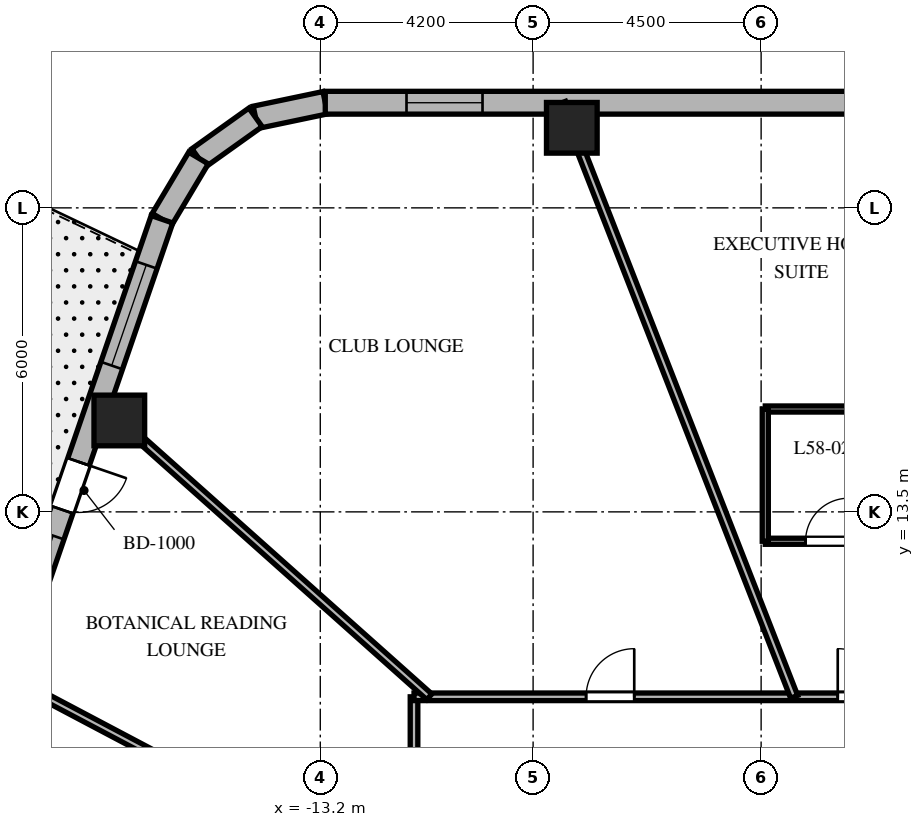
"""IFC4 building model, lengths in metres.
Left out: names, types, materials, properties, quantities, classifications, styles, units other than length and angle.
Written with IfcOpenShell. Run it as: python <this file> out.ifc"""

import sys

from ifc_helpers import new_model, si_unit, direction, frame, frame_2d, origin, origin_2d, place, context, subcontext, project, spatial, rectangle, extrude, element, fill, save


model = new_model("IFC4")
c1 = context("Model", 3, precision=1e-05, world=origin(), true_north=direction((0.0, 1.0)))
c2 = subcontext(c1, "Body", "Model", "MODEL_VIEW")
j1 = project(units=[si_unit("LENGTHUNIT", "METRE"), si_unit("PLANEANGLEUNIT", "RADIAN")], contexts=[c1])
p1 = place(None, origin())
s1 = spatial("IfcSite", under=j1, at=p1, CompositionType="ELEMENT")
p2 = place(p1, origin())
s2 = spatial("IfcBuilding", under=s1, at=p2, CompositionType="ELEMENT")
p3 = place(p2, frame((0.0, 0.0, 233.1)))
s3 = spatial("IfcBuildingStorey", under=s2, at=p3, CompositionType="ELEMENT", Elevation=233.1)
for number, where, z_axis, x_axis in (
    (1, (-8.236, 21.08, 0.0), (0.0, 0.0, 1.0), (1.0, 0.0, 0.0)),
    (2, (-17.166, 15.304, 0.0), (0.0, 0.0, 1.0), (1.0, 0.0, 0.0)),
):
    element("IfcColumn", number, at=place(p3, frame(where, z_axis=z_axis, x_axis=x_axis)), inside=s3, PredefinedType="COLUMN", context=c2, shape_type="SweptSolid", body=[
        extrude(rectangle(XDim=1.0, YDim=1.0, at=origin_2d()), origin(), (0.0, 0.0, 1.0), 3.8),
    ])
p4 = place(p3, frame((-13.102, 21.575, 0.0), z_axis=(0.0, 0.0, 1.0), x_axis=(-0.978757421505, -0.205021730188, 0.0)))
e3 = element("IfcWall", 3, at=p4, inside=s3, PredefinedType="SOLIDWALL", context=c2, shape_type="SweptSolid", body=[
    extrude(rectangle(XDim=1.406, YDim=0.45, at=frame_2d((0.703, 0.0))), origin(), (0.0, 0.0, 1.0), 3.5),
])
p5 = place(p3, frame((-14.478, 21.287, 0.0), z_axis=(0.0, 0.0, 1.0), x_axis=(-0.813888518617, -0.58102106611, 0.0)))
e4 = element("IfcWall", 4, at=p5, inside=s3, PredefinedType="SOLIDWALL", context=c2, shape_type="SweptSolid", body=[
    extrude(rectangle(XDim=1.383, YDim=0.45, at=frame_2d((0.691, 0.0))), origin(), (0.0, 0.0, 1.0), 3.5),
])
p6 = place(p3, frame((-15.604, 20.483, 0.0), z_axis=(0.0, 0.0, 1.0), x_axis=(-0.512222149036, -0.858852996756, 0.0)))
e5 = element("IfcWall", 5, at=p6, inside=s3, PredefinedType="SOLIDWALL", context=c2, shape_type="SweptSolid", body=[
    extrude(rectangle(XDim=1.406, YDim=0.45, at=frame_2d((0.703, 0.0))), origin(), (0.0, 0.0, 1.0), 3.5),
])
p7 = place(p3, frame((11.298, 21.575, 0.0), z_axis=(0.0, 0.0, 1.0), x_axis=(-1.0, 0.0, 0.0)))
e6 = element("IfcWall", 6, at=p7, inside=s3, PredefinedType="SOLIDWALL", context=c2, shape_type="SweptSolid", body=[
    extrude(rectangle(XDim=24.399, YDim=0.45, at=frame_2d((12.2, 0.0))), origin(), (0.0, 0.0, 1.0), 3.5),
])
p8 = place(p7, frame((1.604, 0.0, 0.8)))
e7 = element("IfcOpeningElement", 7, at=p8, cuts=e6, PredefinedType="OPENING", context=c2, shape_type="SweptSolid", body=[
    extrude(rectangle(XDim=1.5, YDim=1.8, at=frame_2d((0.75, 0.9))), frame((0.0, 0.235, 0.0), z_axis=(0.0, -1.0, 0.0), x_axis=(1.0, 0.0, 0.0)), (0.0, 0.0, 1.0), 0.47),
])
p9 = place(p7, frame((11.451, 0.0, 0.8)))
e8 = element("IfcOpeningElement", 8, at=p9, cuts=e6, PredefinedType="OPENING", context=c2, shape_type="SweptSolid", body=[
    extrude(rectangle(XDim=1.5, YDim=1.8, at=frame_2d((0.75, 0.9))), frame((0.0, 0.235, 0.0), z_axis=(0.0, -1.0, 0.0), x_axis=(1.0, 0.0, 0.0)), (0.0, 0.0, 1.0), 0.47),
])
p10 = place(p7, frame((21.296, 0.0, 0.8)))
e9 = element("IfcOpeningElement", 9, at=p10, cuts=e6, PredefinedType="OPENING", context=c2, shape_type="SweptSolid", body=[
    extrude(rectangle(XDim=1.5, YDim=1.8, at=frame_2d((0.75, 0.9))), frame((0.0, 0.235, 0.0), z_axis=(0.0, -1.0, 0.0), x_axis=(1.0, 0.0, 0.0)), (0.0, 0.0, 1.0), 0.47),
])
p11 = place(p3, frame((-16.324, 19.275, 0.0), z_axis=(0.0, 0.0, 1.0), x_axis=(-0.325083142304, -0.945685439557, 0.0)))
e10 = element("IfcWall", 10, at=p11, inside=s3, PredefinedType="SOLIDWALL", context=c2, shape_type="SweptSolid", body=[
    extrude(rectangle(XDim=20.224, YDim=0.45, at=frame_2d((10.112, 0.0))), origin(), (0.0, 0.0, 1.0), 3.5),
])
p12 = place(p11, frame((5.062, 0.0, 0.0)))
e11 = element("IfcOpeningElement", 11, at=p12, cuts=e10, PredefinedType="OPENING", context=c2, shape_type="SweptSolid", body=[
    extrude(rectangle(XDim=1.0, YDim=2.15, at=frame_2d((0.5, 1.075))), frame((0.0, 0.235, 0.0), z_axis=(0.0, -1.0, 0.0), x_axis=(1.0, 0.0, 0.0)), (0.0, 0.0, 1.0), 0.47),
])
p13 = place(p11, frame((0.953, 0.0, 0.8)))
e12 = element("IfcOpeningElement", 12, at=p13, cuts=e10, PredefinedType="OPENING", context=c2, shape_type="SweptSolid", body=[
    extrude(rectangle(XDim=2.1, YDim=1.85, at=frame_2d((1.05, 0.925))), frame((0.0, 0.235, 0.0), z_axis=(0.0, -1.0, 0.0), x_axis=(1.0, 0.0, 0.0)), (0.0, 0.0, 1.0), 0.47),
])
p14 = place(p11, frame((6.604, 0.0, 0.8)))
e13 = element("IfcOpeningElement", 13, at=p14, cuts=e10, PredefinedType="OPENING", context=c2, shape_type="SweptSolid", body=[
    extrude(rectangle(XDim=2.1, YDim=1.85, at=frame_2d((1.05, 0.925))), frame((0.0, 0.235, 0.0), z_axis=(0.0, -1.0, 0.0), x_axis=(1.0, 0.0, 0.0)), (0.0, 0.0, 1.0), 0.47),
])
p15 = place(p11, frame((11.585, 0.0, 0.8)))
e14 = element("IfcOpeningElement", 14, at=p15, cuts=e10, PredefinedType="OPENING", context=c2, shape_type="SweptSolid", body=[
    extrude(rectangle(XDim=2.1, YDim=1.85, at=frame_2d((1.05, 0.925))), frame((0.0, 0.235, 0.0), z_axis=(0.0, -1.0, 0.0), x_axis=(1.0, 0.0, 0.0)), (0.0, 0.0, 1.0), 0.47),
])
p16 = place(p11, frame((17.118, 0.0, 0.8)))
e15 = element("IfcOpeningElement", 15, at=p16, cuts=e10, PredefinedType="OPENING", context=c2, shape_type="SweptSolid", body=[
    extrude(rectangle(XDim=2.1, YDim=1.85, at=frame_2d((1.05, 0.925))), frame((0.0, 0.235, 0.0), z_axis=(0.0, -1.0, 0.0), x_axis=(1.0, 0.0, 0.0)), (0.0, 0.0, 1.0), 0.47),
])
p17 = place(p3, frame((-11.35, 4.4, 0.0), z_axis=(0.0, 0.0, 1.0), x_axis=(0.0, 1.0, 0.0)))
e16 = element("IfcWall", 16, at=p17, inside=s3, PredefinedType="PARTITIONING", context=c2, shape_type="SweptSolid", body=[
    extrude(rectangle(XDim=5.45, YDim=0.15, at=frame_2d((2.725, 0.0))), origin(), (0.0, 0.0, 1.0), 2.99),
])
p18 = place(p17, frame((2.955, 0.0, 0.0)))
e17 = element("IfcOpeningElement", 17, at=p18, cuts=e16, PredefinedType="OPENING", context=c2, shape_type="SweptSolid", body=[
    extrude(rectangle(XDim=0.9, YDim=2.03, at=frame_2d((0.45, 1.015))), frame((0.0, 0.085, 0.0), z_axis=(0.0, -1.0, 0.0), x_axis=(1.0, 0.0, 0.0)), (0.0, 0.0, 1.0), 0.17),
])
p19 = place(p3, frame((-11.35, 9.85, 0.0), z_axis=(0.0, 0.0, 1.0), x_axis=(1.0, 0.0, 0.0)))
e18 = element("IfcWall", 18, at=p19, inside=s3, PredefinedType="PARTITIONING", context=c2, shape_type="SweptSolid", body=[
    extrude(rectangle(XDim=10.43, YDim=0.15, at=frame_2d((5.215, 0.0))), origin(), (0.0, 0.0, 1.0), 2.99),
])
p20 = place(p19, frame((8.362, 0.0, 0.0)))
e19 = element("IfcOpeningElement", 19, at=p20, cuts=e18, PredefinedType="OPENING", context=c2, shape_type="SweptSolid", body=[
    extrude(rectangle(XDim=0.95, YDim=2.03, at=frame_2d((0.475, 1.015))), frame((0.0, 0.085, 0.0), z_axis=(0.0, -1.0, 0.0), x_axis=(1.0, 0.0, 0.0)), (0.0, 0.0, 1.0), 0.17),
])
p21 = place(p19, frame((3.396, 0.0, 0.0)))
e20 = element("IfcOpeningElement", 20, at=p21, cuts=e18, PredefinedType="OPENING", context=c2, shape_type="SweptSolid", body=[
    extrude(rectangle(XDim=0.95, YDim=2.03, at=frame_2d((0.475, 1.015))), frame((0.0, 0.085, 0.0), z_axis=(0.0, -1.0, 0.0), x_axis=(1.0, 0.0, 0.0)), (0.0, 0.0, 1.0), 0.17),
])
p22 = place(p3, frame((-3.848, 9.85, 0.0), z_axis=(0.0, 0.0, 1.0), x_axis=(-0.363921778212, 0.931429513889, 0.0)))
e21 = element("IfcWall", 21, at=p22, inside=s3, PredefinedType="PARTITIONING", context=c2, shape_type="SweptSolid", body=[
    extrude(rectangle(XDim=12.588, YDim=0.15, at=frame_2d((6.294, 0.0))), origin(), (0.0, 0.0, 1.0), 2.74),
])
p23 = place(p3, frame((-11.048, 9.85, 0.0), z_axis=(0.0, 0.0, 1.0), x_axis=(-0.746444434655, 0.665447748492, 0.0)))
e22 = element("IfcWall", 22, at=p23, inside=s3, PredefinedType="PARTITIONING", context=c2, shape_type="SweptSolid", body=[
    extrude(rectangle(XDim=8.732, YDim=0.15, at=frame_2d((4.366, 0.0))), origin(), (0.0, 0.0, 1.0), 2.74),
])
p24 = place(p3, frame((-11.35, 5.999, 0.0), z_axis=(0.0, 0.0, 1.0), x_axis=(-0.884112301724, 0.467274478161, 0.0)))
e23 = element("IfcWall", 23, at=p24, inside=s3, PredefinedType="PARTITIONING", context=c2, shape_type="SweptSolid", body=[
    extrude(rectangle(XDim=9.129, YDim=0.15, at=frame_2d((4.564, 0.0))), origin(), (0.0, 0.0, 1.0), 2.74),
])
p25 = place(p3, frame((-4.418, 12.92, 0.0), z_axis=(0.0, 0.0, 1.0), x_axis=(1.0, 0.0, 0.0)))
e24 = element("IfcWall", 24, at=p25, inside=s3, PredefinedType="PARTITIONING", context=c2, shape_type="SweptSolid", body=[
    extrude(rectangle(XDim=2.44, YDim=0.12, at=frame_2d((1.22, 0.0))), origin(), (0.0, 0.0, 1.0), 3.5),
])
p26 = place(p25, frame((0.795, 0.0, 0.0)))
e25 = element("IfcOpeningElement", 25, at=p26, cuts=e24, PredefinedType="OPENING", context=c2, shape_type="SweptSolid", body=[
    extrude(rectangle(XDim=0.85, YDim=2.03, at=frame_2d((0.425, 1.015))), frame((0.0, 0.07, 0.0), z_axis=(0.0, -1.0, 0.0), x_axis=(1.0, 0.0, 0.0)), (0.0, 0.0, 1.0), 0.14),
])
p27 = place(p3, frame((-1.978, 15.53, 0.0), z_axis=(0.0, 0.0, 1.0), x_axis=(-1.0, 0.0, 0.0)))
e26 = element("IfcWall", 26, at=p27, inside=s3, PredefinedType="PARTITIONING", context=c2, shape_type="SweptSolid", body=[
    extrude(rectangle(XDim=2.44, YDim=0.12, at=frame_2d((1.22, 0.0))), origin(), (0.0, 0.0, 1.0), 3.5),
])
p28 = place(p3, frame((-4.418, 15.53, 0.0), z_axis=(0.0, 0.0, 1.0), x_axis=(0.0, -1.0, 0.0)))
e27 = element("IfcWall", 27, at=p28, inside=s3, PredefinedType="PARTITIONING", context=c2, shape_type="SweptSolid", body=[
    extrude(rectangle(XDim=2.61, YDim=0.12, at=frame_2d((1.305, 0.0))), origin(), (0.0, 0.0, 1.0), 3.026),
])
p29 = place(p10, origin())
e28 = element("IfcWindow", 28, at=p29, inside=s3, PartitioningType="SINGLE_PANEL", PredefinedType="WINDOW", context=c2, shape_type="SweptSolid", body=[
    extrude(rectangle(XDim=1.5, YDim=1.8, at=frame_2d((0.75, 0.9))), frame((0.0, 0.03, 0.0), z_axis=(0.0, -1.0, 0.0), x_axis=(1.0, 0.0, 0.0)), (0.0, 0.0, 1.0), 0.06),
])
fill(e9, e28)
p30 = place(p12, origin())
e29 = element("IfcDoor", 29, at=p30, inside=s3, OperationType="SINGLE_SWING_LEFT", PredefinedType="DOOR", context=c2, shape_type="SweptSolid", body=[
    extrude(rectangle(XDim=1.0, YDim=2.15, at=frame_2d((0.5, 1.075))), frame((0.0, 0.025, 0.0), z_axis=(0.0, -1.0, 0.0), x_axis=(1.0, 0.0, 0.0)), (0.0, 0.0, 1.0), 0.05),
])
fill(e11, e29)
p31 = place(p13, origin())
e30 = element("IfcWindow", 30, at=p31, inside=s3, PartitioningType="SINGLE_PANEL", PredefinedType="WINDOW", context=c2, shape_type="SweptSolid", body=[
    extrude(rectangle(XDim=2.1, YDim=1.85, at=frame_2d((1.05, 0.925))), frame((0.0, 0.03, 0.0), z_axis=(0.0, -1.0, 0.0), x_axis=(1.0, 0.0, 0.0)), (0.0, 0.0, 1.0), 0.06),
])
fill(e12, e30)
p32 = place(p14, origin())
e31 = element("IfcWindow", 31, at=p32, inside=s3, PartitioningType="SINGLE_PANEL", PredefinedType="WINDOW", context=c2, shape_type="SweptSolid", body=[
    extrude(rectangle(XDim=2.1, YDim=1.85, at=frame_2d((1.05, 0.925))), frame((0.0, 0.03, 0.0), z_axis=(0.0, -1.0, 0.0), x_axis=(1.0, 0.0, 0.0)), (0.0, 0.0, 1.0), 0.06),
])
fill(e13, e31)
p33 = place(p20, origin())
e32 = element("IfcDoor", 32, at=p33, inside=s3, OperationType="SINGLE_SWING_LEFT", PredefinedType="DOOR", context=c2, shape_type="SweptSolid", body=[
    extrude(rectangle(XDim=0.95, YDim=2.03, at=frame_2d((0.475, 1.015))), frame((0.0, 0.025, 0.0), z_axis=(0.0, -1.0, 0.0), x_axis=(1.0, 0.0, 0.0)), (0.0, 0.0, 1.0), 0.05),
])
fill(e19, e32)
p34 = place(p26, origin())
e33 = element("IfcDoor", 33, at=p34, inside=s3, OperationType="SINGLE_SWING_RIGHT", PredefinedType="DOOR", context=c2, shape_type="SweptSolid", body=[
    extrude(rectangle(XDim=0.85, YDim=2.03, at=frame_2d((0.425, 1.015))), frame((0.0, 0.025, 0.0), z_axis=(0.0, -1.0, 0.0), x_axis=(1.0, 0.0, 0.0)), (0.0, 0.0, 1.0), 0.05),
])
fill(e25, e33)
p35 = place(p21, origin())
e34 = element("IfcDoor", 34, at=p35, inside=s3, OperationType="SINGLE_SWING_RIGHT", PredefinedType="DOOR", context=c2, shape_type="SweptSolid", body=[
    extrude(rectangle(XDim=0.95, YDim=2.03, at=frame_2d((0.475, 1.015))), frame((0.0, 0.025, 0.0), z_axis=(0.0, -1.0, 0.0), x_axis=(1.0, 0.0, 0.0)), (0.0, 0.0, 1.0), 0.05),
])
fill(e20, e34)
save(model, sys.argv[1])
